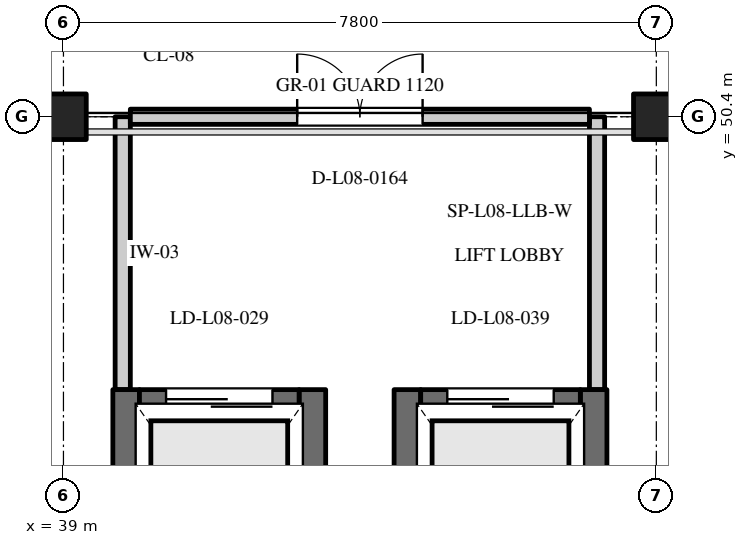
"""IFC4 building model, lengths in metres.
Left out: names, types, materials, properties, quantities, classifications, styles, units other than length and angle.
Written with IfcOpenShell. Run it as: python <this file> out.ifc"""

import sys

from ifc_helpers import new_model, si_unit, direction, frame, frame_2d, origin, origin_2d, place, context, subcontext, project, spatial, rectangle, extrude, element, fill, save


model = new_model("IFC4")
c1 = context("Model", 3, precision=1e-05, world=origin(), true_north=direction((0.0, 1.0)))
c2 = subcontext(c1, "Body", "Model", "MODEL_VIEW")
j1 = project(units=[si_unit("LENGTHUNIT", "METRE"), si_unit("PLANEANGLEUNIT", "RADIAN")], contexts=[c1])
p1 = place(None, origin())
s1 = spatial("IfcSite", under=j1, at=p1, CompositionType="ELEMENT")
p2 = place(p1, origin())
s2 = spatial("IfcBuilding", under=s1, at=p2, CompositionType="ELEMENT")
p3 = place(p2, frame((0.0, 0.0, 33.9)))
s3 = spatial("IfcBuildingStorey", under=s2, at=p3, CompositionType="ELEMENT", Elevation=33.9)
for number, where, z_axis, x_axis in (
    (1, (39.0, 50.4, 0.0), (0.0, 0.0, 1.0), (1.0, 0.0, 0.0)),
    (2, (46.8, 50.4, 0.0), (0.0, 0.0, 1.0), (1.0, 0.0, 0.0)),
):
    element("IfcColumn", number, at=place(p3, frame(where, z_axis=z_axis, x_axis=x_axis)), inside=s3, PredefinedType="COLUMN", context=c2, shape_type="SweptSolid", body=[
        extrude(rectangle(XDim=0.6, YDim=0.6, at=origin_2d()), origin(), (0.0, 0.0, 1.0), 3.9),
    ])
for number, where, z_axis, x_axis in (
    (3, (39.825, 42.76, 0.0), (0.0, 0.0, 1.0), (0.0, 1.0, 0.0)),
    (4, (42.275, 42.76, 0.0), (0.0, 0.0, 1.0), (0.0, 1.0, 0.0)),
):
    element("IfcWall", number, at=place(p3, frame(where, z_axis=z_axis, x_axis=x_axis)), inside=s3, PredefinedType="SHEAR", context=c2, shape_type="SweptSolid", body=[
        extrude(rectangle(XDim=4.05, YDim=0.35, at=frame_2d((2.025, 0.0))), origin(), (0.0, 0.0, 1.0), 3.6),
    ])
p4 = place(p3, frame((40.0, 46.635, 0.0), z_axis=(0.0, 0.0, 1.0), x_axis=(1.0, 0.0, 0.0)))
e5 = element("IfcWall", 5, at=p4, inside=s3, PredefinedType="SHEAR", context=c2, shape_type="SweptSolid", body=[
    extrude(rectangle(XDim=2.1, YDim=0.35, at=frame_2d((1.05, 0.0))), origin(), (0.0, 0.0, 1.0), 3.6),
])
p5 = place(p4, frame((0.35, 0.0, 0.0)))
e6 = element("IfcOpeningElement", 6, at=p5, cuts=e5, PredefinedType="OPENING", context=c2, shape_type="SweptSolid", body=[
    extrude(rectangle(XDim=1.4, YDim=2.2, at=frame_2d((0.7, 1.1))), frame((0.0, 0.187, 0.0), z_axis=(0.0, -1.0, 0.0), x_axis=(1.0, 0.0, 0.0)), (0.0, 0.0, 1.0), 0.374),
])
for number, where, z_axis, x_axis in (
    (7, (43.525, 42.76, 0.0), (0.0, 0.0, 1.0), (0.0, 1.0, 0.0)),
    (8, (45.975, 42.76, 0.0), (0.0, 0.0, 1.0), (0.0, 1.0, 0.0)),
):
    element("IfcWall", number, at=place(p3, frame(where, z_axis=z_axis, x_axis=x_axis)), inside=s3, PredefinedType="SHEAR", context=c2, shape_type="SweptSolid", body=[
        extrude(rectangle(XDim=4.05, YDim=0.35, at=frame_2d((2.025, 0.0))), origin(), (0.0, 0.0, 1.0), 3.6),
    ])
p6 = place(p3, frame((43.7, 46.635, 0.0), z_axis=(0.0, 0.0, 1.0), x_axis=(1.0, 0.0, 0.0)))
e9 = element("IfcWall", 9, at=p6, inside=s3, PredefinedType="SHEAR", context=c2, shape_type="SweptSolid", body=[
    extrude(rectangle(XDim=2.1, YDim=0.35, at=frame_2d((1.05, 0.0))), origin(), (0.0, 0.0, 1.0), 3.6),
])
p7 = place(p6, frame((0.35, 0.0, 0.0)))
e10 = element("IfcOpeningElement", 10, at=p7, cuts=e9, PredefinedType="OPENING", context=c2, shape_type="SweptSolid", body=[
    extrude(rectangle(XDim=1.4, YDim=2.2, at=frame_2d((0.7, 1.1))), frame((0.0, 0.187, 0.0), z_axis=(0.0, -1.0, 0.0), x_axis=(1.0, 0.0, 0.0)), (0.0, 0.0, 1.0), 0.374),
])
for number, where, z_axis, x_axis in (
    (11, (39.78, 46.81, 0.0), (0.0, 0.0, 1.0), (0.0, 1.0, 0.0)),
    (12, (46.02, 46.81, 0.0), (0.0, 0.0, 1.0), (0.0, 1.0, 0.0)),
):
    element("IfcWall", number, at=place(p3, frame(where, z_axis=z_axis, x_axis=x_axis)), inside=s3, PredefinedType="STANDARD", context=c2, shape_type="SweptSolid", body=[
        extrude(rectangle(XDim=3.59, YDim=0.2, at=frame_2d((1.795, 0.0))), origin(), (0.0, 0.0, 1.0), 3.1),
    ])
p8 = place(p3, frame((39.88, 50.4, 0.0), z_axis=(0.0, 0.0, 1.0), x_axis=(1.0, 0.0, 0.0)))
e13 = element("IfcWall", 13, at=p8, inside=s3, PredefinedType="STANDARD", context=c2, shape_type="SweptSolid", body=[
    extrude(rectangle(XDim=6.04, YDim=0.2, at=frame_2d((3.02, 0.0))), origin(), (0.0, 0.0, 1.0), 3.1),
])
p9 = place(p8, frame((2.195, 0.0, 0.0)))
e14 = element("IfcOpeningElement", 14, at=p9, cuts=e13, PredefinedType="OPENING", context=c2, shape_type="SweptSolid", body=[
    extrude(rectangle(XDim=1.65, YDim=2.25, at=frame_2d((0.825, 1.125))), frame((0.0, 0.112, 0.0), z_axis=(0.0, -1.0, 0.0), x_axis=(1.0, 0.0, 0.0)), (0.0, 0.0, 1.0), 0.224),
])
p10 = place(p5, origin())
e15 = element("IfcDoor", 15, at=p10, inside=s3, OperationType="SLIDING_TO_LEFT", PredefinedType="DOOR", context=c2, shape_type="SweptSolid", body=[
    extrude(rectangle(XDim=1.4, YDim=2.2, at=frame_2d((0.7, 1.1))), frame((0.0, 0.025, 0.0), z_axis=(0.0, -1.0, 0.0), x_axis=(1.0, 0.0, 0.0)), (0.0, 0.0, 1.0), 0.05),
])
fill(e6, e15)
p11 = place(p7, origin())
e16 = element("IfcDoor", 16, at=p11, inside=s3, OperationType="SLIDING_TO_LEFT", PredefinedType="DOOR", context=c2, shape_type="SweptSolid", body=[
    extrude(rectangle(XDim=1.4, YDim=2.2, at=frame_2d((0.7, 1.1))), frame((0.0, 0.025, 0.0), z_axis=(0.0, -1.0, 0.0), x_axis=(1.0, 0.0, 0.0)), (0.0, 0.0, 1.0), 0.05),
])
fill(e10, e16)
p12 = place(p9, origin())
e17 = element("IfcDoor", 17, at=p12, inside=s3, OperationType="DOUBLE_DOOR_SINGLE_SWING", PredefinedType="DOOR", context=c2, shape_type="SweptSolid", body=[
    extrude(rectangle(XDim=1.65, YDim=2.25, at=frame_2d((0.825, 1.125))), frame((0.0, 0.025, 0.0), z_axis=(0.0, -1.0, 0.0), x_axis=(1.0, 0.0, 0.0)), (0.0, 0.0, 1.0), 0.05),
])
fill(e14, e17)
save(model, sys.argv[1])
